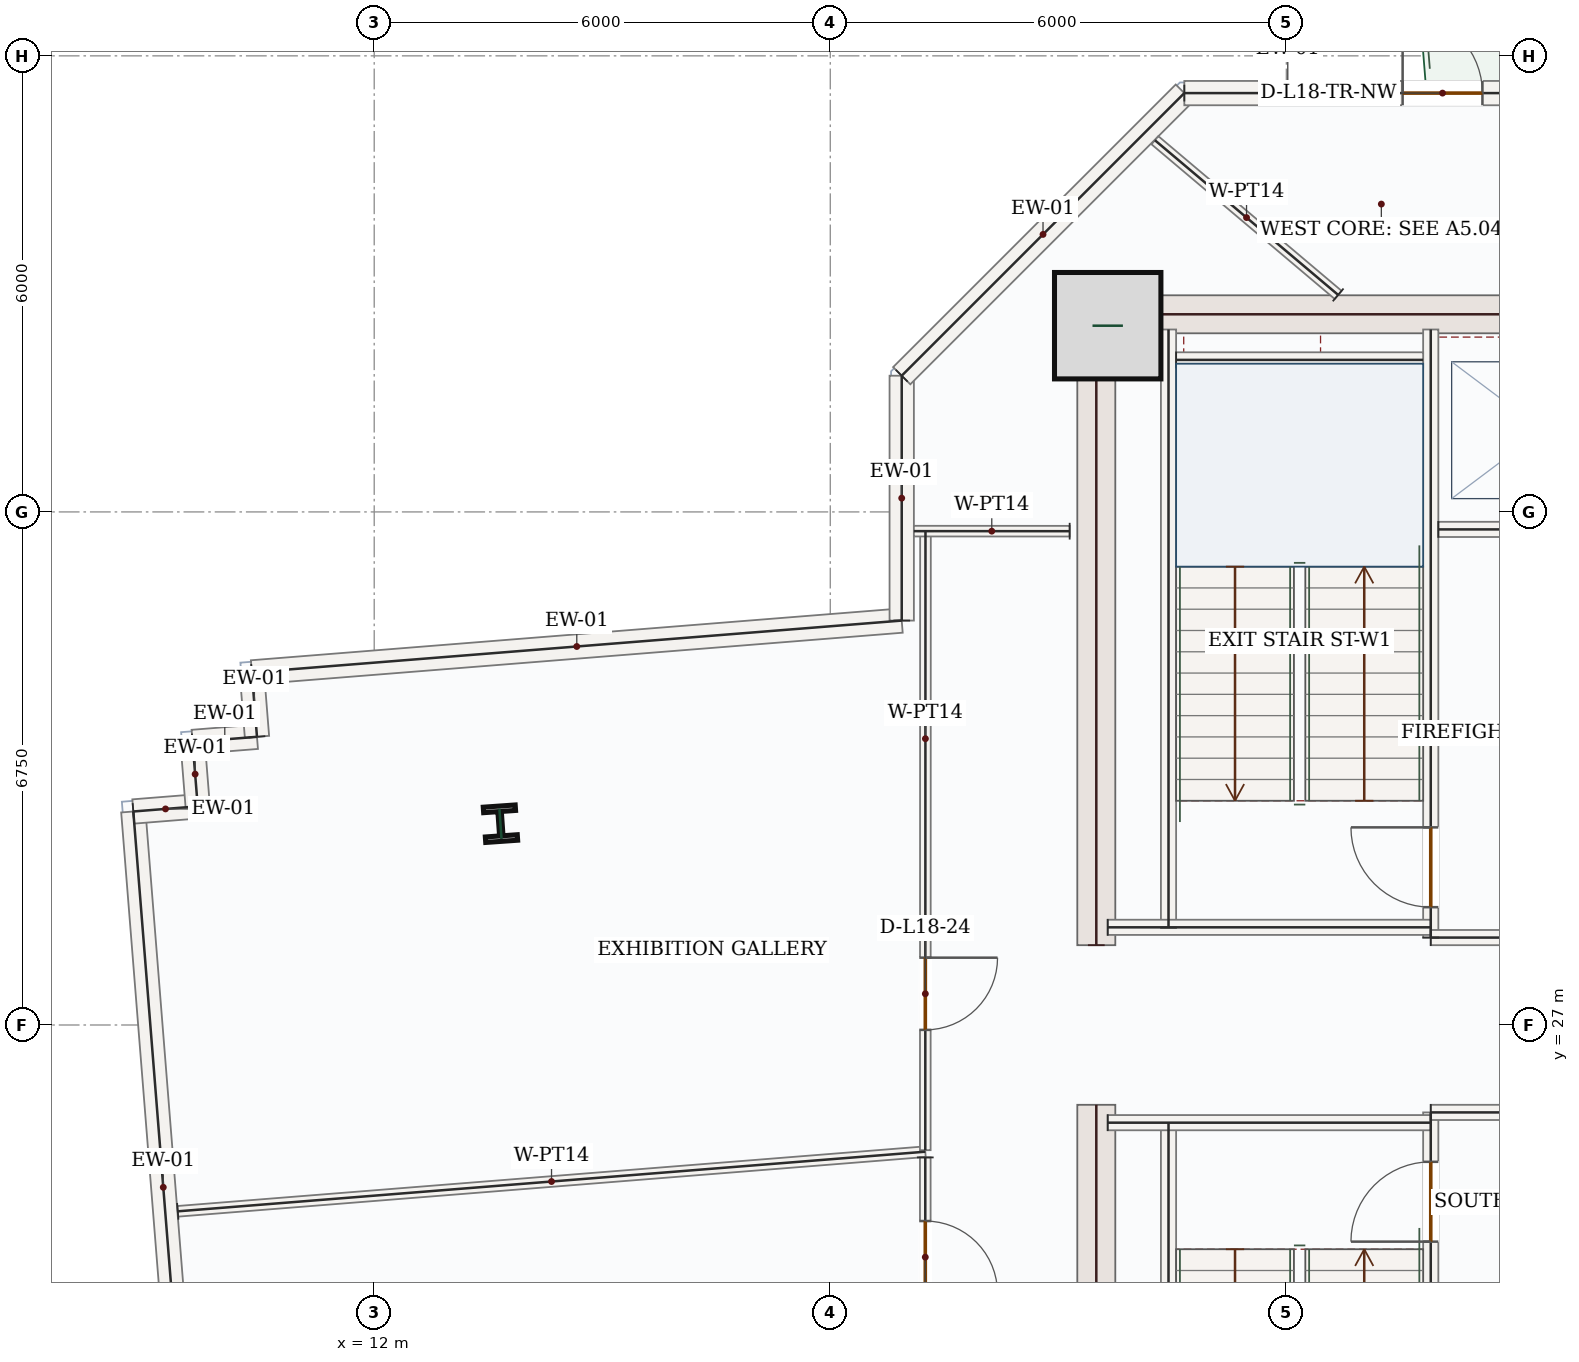
"""IFC4 building model, lengths in metres.
Left out: names, types, materials, properties, quantities, classifications, styles, units other than length and angle.
Written with IfcOpenShell. Run it as: python <this file> out.ifc"""

import sys

from ifc_helpers import new_model, si_unit, direction, frame, frame_2d, origin, origin_2d, place, context, subcontext, project, spatial, rectangle, i_section, extrude, source, transform, mapped, element, fill, save


model = new_model("IFC4")
c1 = context("Model", 3, precision=1e-05, world=origin(), true_north=direction((0.0, 1.0)))
c2 = subcontext(c1, "Body", "Model", "MODEL_VIEW")
j1 = project(units=[si_unit("LENGTHUNIT", "METRE"), si_unit("PLANEANGLEUNIT", "RADIAN")], contexts=[c1])
p1 = place(None, origin())
s1 = spatial("IfcSite", under=j1, at=p1, CompositionType="ELEMENT")
p2 = place(p1, origin())
s2 = spatial("IfcBuilding", under=s1, at=p2, CompositionType="ELEMENT")
p3 = place(p2, frame((0.0, 0.0, 83.7)))
s3 = spatial("IfcBuildingStorey", under=s2, at=p3, CompositionType="ELEMENT", Elevation=83.7)
m1 = source(origin(), c2, "Body", "SweptSolid", [
    extrude(rectangle(XDim=8.55, YDim=0.5, at=frame_2d((4.275, 0.0))), origin(), (0.0, 0.0, 1.0), 3.95),
])
for number, where, z_axis, x_axis in (
    (1, (21.5, 17.4, 0.0), (0.0, 0.0, 1.0), (0.0, 1.0, 0.0)),
    (2, (21.5, 28.05, 0.0), (0.0, 0.0, 1.0), (0.0, 1.0, 0.0)),
):
    element("IfcWall", number, at=place(p3, frame(where, z_axis=z_axis, x_axis=x_axis)), inside=s3, PredefinedType="SHEAR", context=c2, shape_type="MappedRepresentation", body=[
        mapped(m1, transform((0.0, 0.0, 0.0), x_axis=(1.0, 0.0, 0.0), y_axis=(0.0, 1.0, 0.0), z_axis=(0.0, 0.0, 1.0), scale=1.0)),
    ])
m2 = source(origin(), c2, "Body", "SweptSolid", [
    extrude(rectangle(XDim=7.0, YDim=0.5, at=frame_2d((3.5, 0.0))), origin(), (0.0, 0.0, 1.0), 3.95),
])
p4 = place(p3, frame((21.75, 36.35, 0.0), z_axis=(0.0, 0.0, 1.0), x_axis=(1.0, 0.0, 0.0)))
e3 = element("IfcWall", 3, at=p4, inside=s3, PredefinedType="SHEAR", context=c2, shape_type="MappedRepresentation", body=[
    mapped(m2, transform((0.0, 0.0, 0.0), x_axis=(1.0, 0.0, 0.0), y_axis=(0.0, 1.0, 0.0), z_axis=(0.0, 0.0, 1.0), scale=1.0)),
])
m3 = source(origin(), c2, "Body", "SweptSolid", [
    extrude(rectangle(XDim=1.4, YDim=1.4, at=origin_2d()), origin(), (0.0, 0.0, 1.0), 4.2),
])
p5 = place(p3, frame((21.65, 36.2, 0.0), z_axis=(0.0, 0.0, 1.0), x_axis=(1.0, 0.0, 0.0)))
e4 = element("IfcColumn", 4, at=p5, inside=s3, PredefinedType="COLUMN", context=c2, shape_type="MappedRepresentation", body=[
    mapped(m3, transform((0.0, 0.0, 0.0), x_axis=(1.0, 0.0, 0.0), y_axis=(0.0, 1.0, 0.0), z_axis=(0.0, 0.0, 1.0), scale=1.0)),
])
m4 = source(origin(), c2, "Body", "SweptSolid", [
    extrude(i_section(OverallWidth=0.421, OverallDepth=0.465, WebThickness=0.045, FlangeThickness=0.073, FilletRadius=0.018, at=origin_2d()), origin(), (0.0, 0.0, 1.0), 4.2),
])
p6 = place(p3, frame((13.661, 29.648, 0.0), z_axis=(0.0, 0.0, 1.0), x_axis=(0.99756405026, 0.069756473744, 0.0)))
e5 = element("IfcColumn", 5, at=p6, inside=s3, PredefinedType="COLUMN", context=c2, shape_type="MappedRepresentation", body=[
    mapped(m4, transform((0.0, 0.0, 0.0), x_axis=(1.0, 0.0, 0.0), y_axis=(0.0, 1.0, 0.0), z_axis=(0.0, 0.0, 1.0), scale=1.0)),
])
m5 = source(origin(), c2, "Body", "SweptSolid", [
    extrude(rectangle(XDim=9.92, YDim=0.32, at=frame_2d((4.96, 0.0))), origin(), (0.0, 0.0, 1.0), 3.95),
])
p7 = place(p3, frame((9.619, 19.92, 0.0), z_axis=(0.0, 0.0, 1.0), x_axis=(-0.07949480177, 0.996835280521, 0.0)))
e6 = element("IfcWall", 6, at=p7, inside=s3, PredefinedType="SOLIDWALL", context=c2, shape_type="MappedRepresentation", body=[
    mapped(m5, transform((0.0, 0.0, 0.0), x_axis=(1.0, 0.0, 0.0), y_axis=(0.0, 1.0, 0.0), z_axis=(0.0, 0.0, 1.0), scale=1.0)),
])
m6 = source(origin(), c2, "Body", "SweptSolid", [
    extrude(rectangle(XDim=0.85, YDim=0.32, at=frame_2d((0.425, 0.0))), origin(), (0.0, 0.0, 1.0), 3.95),
])
p8 = place(p3, frame((8.831, 29.809, 0.0), z_axis=(0.0, 0.0, 1.0), x_axis=(0.996828965123, 0.079573954853, 0.0)))
e7 = element("IfcWall", 7, at=p8, inside=s3, PredefinedType="SOLIDWALL", context=c2, shape_type="MappedRepresentation", body=[
    mapped(m6, transform((0.0, 0.0, 0.0), x_axis=(1.0, 0.0, 0.0), y_axis=(0.0, 1.0, 0.0), z_axis=(0.0, 0.0, 1.0), scale=1.0)),
])
m7 = source(origin(), c2, "Body", "SweptSolid", [
    extrude(rectangle(XDim=0.85, YDim=0.32, at=frame_2d((0.425, 0.0))), origin(), (0.0, 0.0, 1.0), 3.95),
])
for number, where, z_axis, x_axis in (
    (8, (9.678, 29.876, 0.0), (0.0, 0.0, 1.0), (-0.08, 0.997, 0.0)),
    (9, (9.61, 30.724, 0.0), (0.0, 0.0, 1.0), (0.997, 0.079, 0.0)),
    (10, (10.458, 30.791, 0.0), (0.0, 0.0, 1.0), (-0.08, 0.997, 0.0)),
):
    element("IfcWall", number, at=place(p3, frame(where, z_axis=z_axis, x_axis=x_axis)), inside=s3, PredefinedType="SOLIDWALL", context=c2, shape_type="MappedRepresentation", body=[
        mapped(m7, transform((0.0, 0.0, 0.0), x_axis=(1.0, 0.0, 0.0), y_axis=(0.0, 1.0, 0.0), z_axis=(0.0, 0.0, 1.0), scale=1.0)),
    ])
m8 = source(origin(), c2, "Body", "SweptSolid", [
    extrude(rectangle(XDim=8.577, YDim=0.32, at=frame_2d((4.289, 0.0))), origin(), (0.0, 0.0, 1.0), 3.95),
])
p9 = place(p3, frame((10.39, 31.639, 0.0), z_axis=(0.0, 0.0, 1.0), x_axis=(0.996834708052, 0.07950198, 0.0)))
e11 = element("IfcWall", 11, at=p9, inside=s3, PredefinedType="SOLIDWALL", context=c2, shape_type="MappedRepresentation", body=[
    mapped(m8, transform((0.0, 0.0, 0.0), x_axis=(1.0, 0.0, 0.0), y_axis=(0.0, 1.0, 0.0), z_axis=(0.0, 0.0, 1.0), scale=1.0)),
])
m9 = source(origin(), c2, "Body", "SweptSolid", [
    extrude(rectangle(XDim=3.221, YDim=0.32, at=frame_2d((1.611, 0.0))), origin(), (0.0, 0.0, 1.0), 3.95),
])
p10 = place(p3, frame((18.94, 32.321, 0.0), z_axis=(0.0, 0.0, 1.0), x_axis=(0.0, 1.0, 0.0)))
e12 = element("IfcWall", 12, at=p10, inside=s3, PredefinedType="SOLIDWALL", context=c2, shape_type="MappedRepresentation", body=[
    mapped(m9, transform((0.0, 0.0, 0.0), x_axis=(1.0, 0.0, 0.0), y_axis=(0.0, 1.0, 0.0), z_axis=(0.0, 0.0, 1.0), scale=1.0)),
])
m10 = source(origin(), c2, "Body", "SweptSolid", [
    extrude(rectangle(XDim=5.258, YDim=0.32, at=frame_2d((2.629, 0.0))), origin(), (0.0, 0.0, 1.0), 3.95),
])
p11 = place(p3, frame((18.94, 35.542, 0.0), z_axis=(0.0, 0.0, 1.0), x_axis=(0.707106781187, 0.707106781187, 0.0)))
e13 = element("IfcWall", 13, at=p11, inside=s3, PredefinedType="SOLIDWALL", context=c2, shape_type="MappedRepresentation", body=[
    mapped(m10, transform((0.0, 0.0, 0.0), x_axis=(1.0, 0.0, 0.0), y_axis=(0.0, 1.0, 0.0), z_axis=(0.0, 0.0, 1.0), scale=1.0)),
])
p12 = place(p3, frame((22.658, 39.26, 0.0), z_axis=(0.0, 0.0, 1.0), x_axis=(1.0, 0.0, 0.0)))
e14 = element("IfcWall", 14, at=p12, inside=s3, PredefinedType="SOLIDWALL", context=c2, shape_type="SweptSolid", body=[
    extrude(rectangle(XDim=5.683, YDim=0.32, at=frame_2d((2.842, 0.0))), origin(), (0.0, 0.0, 1.0), 3.95),
])
p13 = place(p12, frame((2.872, 0.0, 0.0)))
e15 = element("IfcOpeningElement", 15, at=p13, cuts=e14, PredefinedType="OPENING", context=c2, shape_type="SweptSolid", body=[
    extrude(rectangle(XDim=1.05, YDim=2.15, at=frame_2d((0.525, 1.075))), frame((0.0, 0.17, 0.0), z_axis=(0.0, -1.0, 0.0), x_axis=(1.0, 0.0, 0.0)), (0.0, 0.0, 1.0), 0.34),
])
m11 = source(origin(), c2, "Body", "SweptSolid", [
    extrude(rectangle(XDim=7.87, YDim=0.2, at=frame_2d((3.935, 0.0))), origin(), (0.0, 0.0, 1.0), 3.95),
])
for number, where, z_axis, x_axis in (
    (16, (22.45, 17.85, 0.0), (0.0, 0.0, 1.0), (0.0, 1.0, 0.0)),
    (17, (22.45, 28.28, 0.0), (0.0, 0.0, 1.0), (0.0, 1.0, 0.0)),
):
    element("IfcWall", number, at=place(p3, frame(where, z_axis=z_axis, x_axis=x_axis)), inside=s3, PredefinedType="SOLIDWALL", context=c2, shape_type="MappedRepresentation", body=[
        mapped(m11, transform((0.0, 0.0, 0.0), x_axis=(1.0, 0.0, 0.0), y_axis=(0.0, 1.0, 0.0), z_axis=(0.0, 0.0, 1.0), scale=1.0)),
    ])
p14 = place(p3, frame((25.9, 17.85, 0.0), z_axis=(0.0, 0.0, 1.0), x_axis=(0.0, 1.0, 0.0)))
e18 = element("IfcWall", 18, at=p14, inside=s3, PredefinedType="SOLIDWALL", context=c2, shape_type="SweptSolid", body=[
    extrude(rectangle(XDim=8.0, YDim=0.2, at=frame_2d((4.0, 0.0))), origin(), (0.0, 0.0, 1.0), 3.95),
])
p15 = place(p14, frame((6.3, 0.0, 0.0)))
e19 = element("IfcOpeningElement", 19, at=p15, cuts=e18, PredefinedType="OPENING", context=c2, shape_type="SweptSolid", body=[
    extrude(rectangle(XDim=1.05, YDim=2.15, at=frame_2d((0.525, 1.075))), frame((0.0, 0.11, 0.0), z_axis=(0.0, -1.0, 0.0), x_axis=(1.0, 0.0, 0.0)), (0.0, 0.0, 1.0), 0.22),
])
p16 = place(p3, frame((25.9, 28.15, 0.0), z_axis=(0.0, 0.0, 1.0), x_axis=(0.0, 1.0, 0.0)))
e20 = element("IfcWall", 20, at=p16, inside=s3, PredefinedType="SOLIDWALL", context=c2, shape_type="SweptSolid", body=[
    extrude(rectangle(XDim=8.0, YDim=0.2, at=frame_2d((4.0, 0.0))), origin(), (0.0, 0.0, 1.0), 3.95),
])
p17 = place(p16, frame((0.4, 0.0, 0.0)))
e21 = element("IfcOpeningElement", 21, at=p17, cuts=e20, PredefinedType="OPENING", context=c2, shape_type="SweptSolid", body=[
    extrude(rectangle(XDim=1.05, YDim=2.15, at=frame_2d((0.525, 1.075))), frame((0.0, 0.11, 0.0), z_axis=(0.0, -1.0, 0.0), x_axis=(1.0, 0.0, 0.0)), (0.0, 0.0, 1.0), 0.22),
])
m12 = source(origin(), c2, "Body", "SweptSolid", [
    extrude(rectangle(XDim=4.25, YDim=0.2, at=frame_2d((2.125, 0.0))), origin(), (0.0, 0.0, 1.0), 3.95),
])
p18 = place(p3, frame((21.65, 25.715, 0.0), z_axis=(0.0, 0.0, 1.0), x_axis=(1.0, 0.0, 0.0)))
e22 = element("IfcWall", 22, at=p18, inside=s3, PredefinedType="SOLIDWALL", context=c2, shape_type="MappedRepresentation", body=[
    mapped(m12, transform((0.0, 0.0, 0.0), x_axis=(1.0, 0.0, 0.0), y_axis=(0.0, 1.0, 0.0), z_axis=(0.0, 0.0, 1.0), scale=1.0)),
])
m13 = source(origin(), c2, "Body", "SweptSolid", [
    extrude(rectangle(XDim=3.0, YDim=0.2, at=frame_2d((1.5, 0.0))), origin(), (0.0, 0.0, 1.0), 3.95),
])
p19 = place(p3, frame((25.9, 25.85, 0.0), z_axis=(0.0, 0.0, 1.0), x_axis=(1.0, 0.0, 0.0)))
e23 = element("IfcWall", 23, at=p19, inside=s3, PredefinedType="SOLIDWALL", context=c2, shape_type="MappedRepresentation", body=[
    mapped(m13, transform((0.0, 0.0, 0.0), x_axis=(1.0, 0.0, 0.0), y_axis=(0.0, 1.0, 0.0), z_axis=(0.0, 0.0, 1.0), scale=1.0)),
])
p20 = place(p3, frame((21.65, 28.285, 0.0), z_axis=(0.0, 0.0, 1.0), x_axis=(1.0, 0.0, 0.0)))
e24 = element("IfcWall", 24, at=p20, inside=s3, PredefinedType="SOLIDWALL", context=c2, shape_type="MappedRepresentation", body=[
    mapped(m12, transform((0.0, 0.0, 0.0), x_axis=(1.0, 0.0, 0.0), y_axis=(0.0, 1.0, 0.0), z_axis=(0.0, 0.0, 1.0), scale=1.0)),
])
p21 = place(p3, frame((25.9, 28.15, 0.0), z_axis=(0.0, 0.0, 1.0), x_axis=(1.0, 0.0, 0.0)))
e25 = element("IfcWall", 25, at=p21, inside=s3, PredefinedType="SOLIDWALL", context=c2, shape_type="MappedRepresentation", body=[
    mapped(m13, transform((0.0, 0.0, 0.0), x_axis=(1.0, 0.0, 0.0), y_axis=(0.0, 1.0, 0.0), z_axis=(0.0, 0.0, 1.0), scale=1.0)),
])
m14 = source(origin(), c2, "Body", "SweptSolid", [
    extrude(rectangle(XDim=3.25, YDim=0.2, at=frame_2d((1.625, 0.0))), origin(), (0.0, 0.0, 1.0), 3.95),
])
p22 = place(p3, frame((22.55, 35.75, 0.0), z_axis=(0.0, 0.0, 1.0), x_axis=(1.0, 0.0, 0.0)))
e26 = element("IfcWall", 26, at=p22, inside=s3, PredefinedType="SOLIDWALL", context=c2, shape_type="MappedRepresentation", body=[
    mapped(m14, transform((0.0, 0.0, 0.0), x_axis=(1.0, 0.0, 0.0), y_axis=(0.0, 1.0, 0.0), z_axis=(0.0, 0.0, 1.0), scale=1.0)),
])
p23 = place(p3, frame((26.0, 33.52, 0.0), z_axis=(0.0, 0.0, 1.0), x_axis=(1.0, 0.0, 0.0)))
e27 = element("IfcWall", 27, at=p23, inside=s3, PredefinedType="SOLIDWALL", context=c2, shape_type="SweptSolid", body=[
    extrude(rectangle(XDim=2.75, YDim=0.2, at=frame_2d((1.375, 0.0))), origin(), (0.0, 0.0, 1.0), 3.95),
])
p24 = place(p23, frame((0.82, 0.0, 0.0)))
e28 = element("IfcOpeningElement", 28, at=p24, cuts=e27, PredefinedType="OPENING", context=c2, shape_type="SweptSolid", body=[
    extrude(rectangle(XDim=1.1, YDim=2.15, at=frame_2d((0.55, 1.075))), frame((0.0, 0.11, 0.0), z_axis=(0.0, -1.0, 0.0), x_axis=(1.0, 0.0, 0.0)), (0.0, 0.0, 1.0), 0.22),
])
m15 = source(origin(), c2, "Body", "SweptSolid", [
    extrude(rectangle(XDim=3.155, YDim=0.14, at=frame_2d((1.577, 0.0))), origin(), (0.0, 0.0, 1.0), 3.95),
])
p25 = place(p3, frame((24.682, 36.605, 0.0), z_axis=(0.0, 0.0, 1.0), x_axis=(-0.76411384058, 0.645081420159, 0.0)))
e29 = element("IfcWall", 29, at=p25, inside=s3, PredefinedType="PARTITIONING", context=c2, shape_type="MappedRepresentation", body=[
    mapped(m15, transform((0.0, 0.0, 0.0), x_axis=(1.0, 0.0, 0.0), y_axis=(0.0, 1.0, 0.0), z_axis=(0.0, 0.0, 1.0), scale=1.0)),
])
m16 = source(origin(), c2, "Body", "SweptSolid", [
    extrude(rectangle(XDim=9.865, YDim=0.14, at=frame_2d((4.933, 0.0))), origin(), (0.0, 0.0, 1.0), 3.95),
])
p26 = place(p3, frame((9.416, 24.549, 0.0), z_axis=(0.0, 0.0, 1.0), x_axis=(0.996833900052, 0.079512110446, 0.0)))
e30 = element("IfcWall", 30, at=p26, inside=s3, PredefinedType="PARTITIONING", context=c2, shape_type="MappedRepresentation", body=[
    mapped(m16, transform((0.0, 0.0, 0.0), x_axis=(1.0, 0.0, 0.0), y_axis=(0.0, 1.0, 0.0), z_axis=(0.0, 0.0, 1.0), scale=1.0)),
])
p27 = place(p3, frame((19.25, 25.258, 0.0), z_axis=(0.0, 0.0, 1.0), x_axis=(0.000102701037, -0.999999994726, 0.0)))
e31 = element("IfcWall", 31, at=p27, inside=s3, PredefinedType="PARTITIONING", context=c2, shape_type="SweptSolid", body=[
    extrude(rectangle(XDim=4.754, YDim=0.14, at=frame_2d((2.377, 0.0))), origin(), (0.0, 0.0, 1.0), 3.95),
])
p28 = place(p27, frame((0.837, 0.0, 0.0)))
e32 = element("IfcOpeningElement", 32, at=p28, cuts=e31, PredefinedType="OPENING", context=c2, shape_type="SweptSolid", body=[
    extrude(rectangle(XDim=0.95, YDim=2.15, at=frame_2d((0.475, 1.075))), frame((0.0, 0.08, 0.0), z_axis=(0.0, -1.0, 0.0), x_axis=(1.0, 0.0, 0.0)), (0.0, 0.0, 1.0), 0.16),
])
p29 = place(p3, frame((19.253, 33.497, 0.0), z_axis=(0.0, 0.0, 1.0), x_axis=(-0.000329746078, -0.999999945634, 0.0)))
e33 = element("IfcWall", 33, at=p29, inside=s3, PredefinedType="PARTITIONING", context=c2, shape_type="SweptSolid", body=[
    extrude(rectangle(XDim=8.144, YDim=0.14, at=frame_2d((4.072, 0.0))), origin(), (0.0, 0.0, 1.0), 3.95),
])
p30 = place(p29, frame((5.611, 0.0, 0.0)))
e34 = element("IfcOpeningElement", 34, at=p30, cuts=e33, PredefinedType="OPENING", context=c2, shape_type="SweptSolid", body=[
    extrude(rectangle(XDim=0.95, YDim=2.15, at=frame_2d((0.475, 1.075))), frame((0.0, 0.08, 0.0), z_axis=(0.0, -1.0, 0.0), x_axis=(1.0, 0.0, 0.0)), (0.0, 0.0, 1.0), 0.16),
])
m17 = source(origin(), c2, "Body", "SweptSolid", [
    extrude(rectangle(XDim=2.049, YDim=0.14, at=frame_2d((1.025, 0.0))), origin(), (0.0, 0.0, 1.0), 3.95),
])
p31 = place(p3, frame((21.149, 33.497, 0.0), z_axis=(0.0, 0.0, 1.0), x_axis=(-0.999999936133, 0.000357398119, 0.0)))
e35 = element("IfcWall", 35, at=p31, inside=s3, PredefinedType="PARTITIONING", context=c2, shape_type="MappedRepresentation", body=[
    mapped(m17, transform((0.0, 0.0, 0.0), x_axis=(1.0, 0.0, 0.0), y_axis=(0.0, 1.0, 0.0), z_axis=(0.0, 0.0, 1.0), scale=1.0)),
])
m18 = source(origin(), c2, "Body", "SweptSolid", [
    extrude(rectangle(XDim=1.05, YDim=2.15, at=frame_2d((0.525, 1.075))), frame((0.0, 0.025, 0.0), z_axis=(0.0, -1.0, 0.0), x_axis=(1.0, 0.0, 0.0)), (0.0, 0.0, 1.0), 0.05),
])
p32 = place(p13, origin())
e36 = element("IfcDoor", 36, at=p32, inside=s3, OperationType="SINGLE_SWING_LEFT", PredefinedType="DOOR", context=c2, shape_type="MappedRepresentation", body=[
    mapped(m18, transform((0.0, 0.0, 0.0), x_axis=(1.0, 0.0, 0.0), y_axis=(0.0, 1.0, 0.0), z_axis=(0.0, 0.0, 1.0), scale=1.0)),
])
fill(e15, e36)
p33 = place(p17, origin())
e37 = element("IfcDoor", 37, at=p33, inside=s3, OperationType="SINGLE_SWING_RIGHT", PredefinedType="DOOR", context=c2, shape_type="MappedRepresentation", body=[
    mapped(m18, transform((0.0, 0.0, 0.0), x_axis=(1.0, 0.0, 0.0), y_axis=(0.0, 1.0, 0.0), z_axis=(0.0, 0.0, 1.0), scale=1.0)),
])
fill(e21, e37)
p34 = place(p15, origin())
e38 = element("IfcDoor", 38, at=p34, inside=s3, OperationType="SINGLE_SWING_LEFT", PredefinedType="DOOR", context=c2, shape_type="MappedRepresentation", body=[
    mapped(m18, transform((0.0, 0.0, 0.0), x_axis=(1.0, 0.0, 0.0), y_axis=(0.0, 1.0, 0.0), z_axis=(0.0, 0.0, 1.0), scale=1.0)),
])
fill(e19, e38)
m19 = source(origin(), c2, "Body", "SweptSolid", [
    extrude(rectangle(XDim=0.95, YDim=2.15, at=frame_2d((0.475, 1.075))), frame((0.0, 0.025, 0.0), z_axis=(0.0, -1.0, 0.0), x_axis=(1.0, 0.0, 0.0)), (0.0, 0.0, 1.0), 0.05),
])
p35 = place(p30, origin())
e39 = element("IfcDoor", 39, at=p35, inside=s3, OperationType="SINGLE_SWING_LEFT", PredefinedType="DOOR", context=c2, shape_type="MappedRepresentation", body=[
    mapped(m19, transform((0.0, 0.0, 0.0), x_axis=(1.0, 0.0, 0.0), y_axis=(0.0, 1.0, 0.0), z_axis=(0.0, 0.0, 1.0), scale=1.0)),
])
fill(e34, e39)
p36 = place(p28, origin())
e40 = element("IfcDoor", 40, at=p36, inside=s3, OperationType="SINGLE_SWING_RIGHT", PredefinedType="DOOR", context=c2, shape_type="MappedRepresentation", body=[
    mapped(m19, transform((0.0, 0.0, 0.0), x_axis=(1.0, 0.0, 0.0), y_axis=(0.0, 1.0, 0.0), z_axis=(0.0, 0.0, 1.0), scale=1.0)),
])
fill(e32, e40)
save(model, sys.argv[1])
